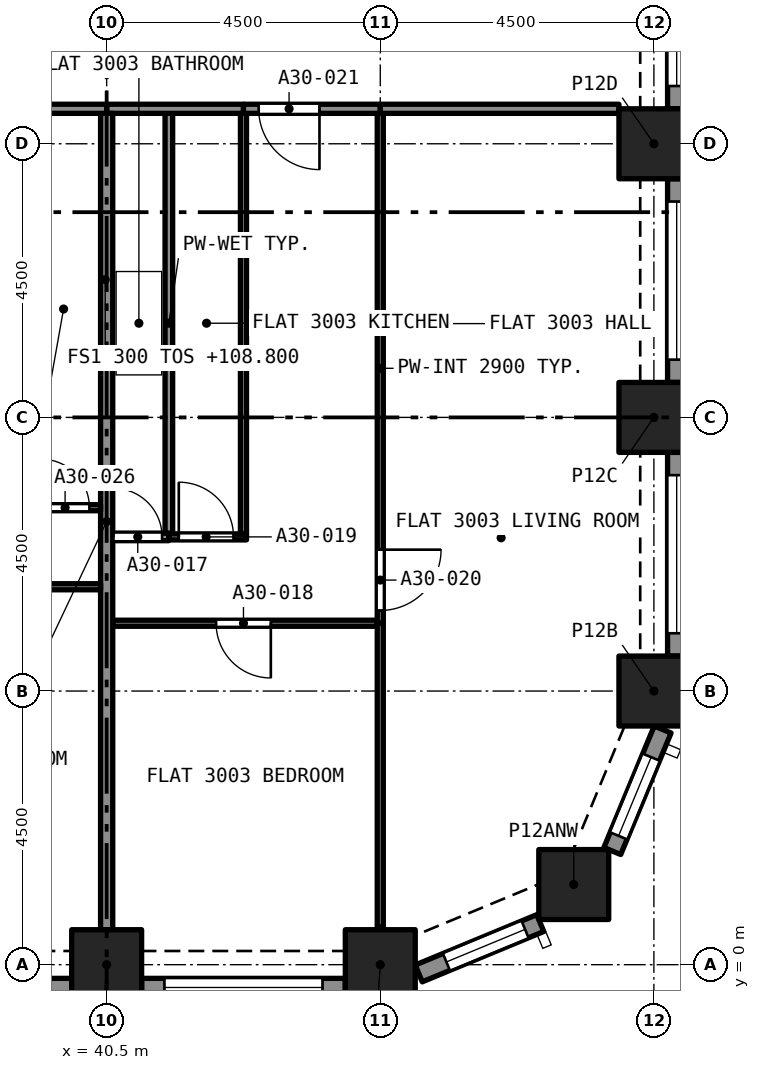
"""IFC4 building model, lengths in metres.
Left out: names, types, materials, properties, quantities, classifications, styles, units other than length and angle.
Written with IfcOpenShell. Run it as: python <this file> out.ifc"""

import sys

from ifc_helpers import new_model, si_unit, direction, frame, frame_2d, origin, origin_2d, place, context, subcontext, project, spatial, rectangle, extrude, element, fill, save


model = new_model("IFC4")
c1 = context("Model", 3, precision=1e-05, world=origin(), true_north=direction((0.0, 1.0)))
c2 = subcontext(c1, "Body", "Model", "MODEL_VIEW")
j1 = project(units=[si_unit("LENGTHUNIT", "METRE"), si_unit("PLANEANGLEUNIT", "RADIAN")], contexts=[c1])
p1 = place(None, origin())
s1 = spatial("IfcSite", under=j1, at=p1, CompositionType="ELEMENT")
p2 = place(p1, origin())
s2 = spatial("IfcBuilding", under=s1, at=p2, CompositionType="ELEMENT")
p3 = place(p2, frame((0.0, 0.0, 108.8)))
s3 = spatial("IfcBuildingStorey", under=s2, at=p3, CompositionType="ELEMENT", Elevation=108.8)
for number, where, z_axis, x_axis in (
    (1, (40.5, 0.0, 0.0), (0.0, 0.0, 1.0), (1.0, 0.0, 0.0)),
    (2, (45.0, 0.0, 0.0), (0.0, 0.0, 1.0), (1.0, 0.0, 0.0)),
    (3, (48.182, 1.318, 0.0), (0.0, 0.0, 1.0), (1.0, 0.0, 0.0)),
    (4, (49.5, 4.5, 0.0), (0.0, 0.0, 1.0), (1.0, 0.0, 0.0)),
    (5, (49.5, 9.0, 0.0), (0.0, 0.0, 1.0), (1.0, 0.0, 0.0)),
    (6, (49.5, 13.5, 0.0), (0.0, 0.0, 1.0), (1.0, 0.0, 0.0)),
):
    element("IfcColumn", number, at=place(p3, frame(where, z_axis=z_axis, x_axis=x_axis)), inside=s3, PredefinedType="COLUMN", context=c2, shape_type="SweptSolid", body=[
        extrude(rectangle(XDim=1.15, YDim=1.15, at=origin_2d()), origin(), (0.0, 0.0, 1.0), 3.2),
    ])
p4 = place(p3, frame((39.925, -0.375, 0.0), z_axis=(0.0, 0.0, 1.0), x_axis=(-1.0, 0.0, 0.0)))
e7 = element("IfcWall", 7, at=p4, inside=s3, PredefinedType="SOLIDWALL", context=c2, shape_type="SweptSolid", body=[
    extrude(rectangle(XDim=3.35, YDim=0.3, at=frame_2d((1.675, 0.0))), origin(), (0.0, 0.0, 1.0), 3.2),
])
p5 = place(p4, frame((0.375, 0.0, 0.45)))
e8 = element("IfcOpeningElement", 8, at=p5, cuts=e7, PredefinedType="OPENING", context=c2, shape_type="SweptSolid", body=[
    extrude(rectangle(XDim=2.6, YDim=1.95, at=frame_2d((1.3, 0.975))), frame((0.0, 0.16, 0.0), z_axis=(0.0, -1.0, 0.0), x_axis=(1.0, 0.0, 0.0)), (0.0, 0.0, 1.0), 0.32),
])
p6 = place(p3, frame((44.425, -0.375, 0.0), z_axis=(0.0, 0.0, 1.0), x_axis=(-1.0, 0.0, 0.0)))
e9 = element("IfcWall", 9, at=p6, inside=s3, PredefinedType="SOLIDWALL", context=c2, shape_type="SweptSolid", body=[
    extrude(rectangle(XDim=3.35, YDim=0.3, at=frame_2d((1.675, 0.0))), origin(), (0.0, 0.0, 1.0), 3.2),
])
p7 = place(p6, frame((0.375, 0.0, 0.45)))
e10 = element("IfcOpeningElement", 10, at=p7, cuts=e9, PredefinedType="OPENING", context=c2, shape_type="SweptSolid", body=[
    extrude(rectangle(XDim=2.6, YDim=1.95, at=frame_2d((1.3, 0.975))), frame((0.0, 0.16, 0.0), z_axis=(0.0, -1.0, 0.0), x_axis=(1.0, 0.0, 0.0)), (0.0, 0.0, 1.0), 0.32),
])
p8 = place(p3, frame((47.631, 0.684, 0.0), z_axis=(0.0, 0.0, 1.0), x_axis=(-0.923862802911, -0.382723818695, 0.0)))
e11 = element("IfcWall", 11, at=p8, inside=s3, PredefinedType="SOLIDWALL", context=c2, shape_type="SweptSolid", body=[
    extrude(rectangle(XDim=2.164, YDim=0.3, at=frame_2d((1.082, 0.0))), origin(), (0.0, 0.0, 1.0), 3.2),
])
p9 = place(p8, frame((0.271, 0.0, 0.45)))
e12 = element("IfcOpeningElement", 12, at=p9, cuts=e11, PredefinedType="OPENING", context=c2, shape_type="SweptSolid", body=[
    extrude(rectangle(XDim=1.4, YDim=1.95, at=frame_2d((0.7, 0.975))), frame((0.0, 0.16, 0.0), z_axis=(0.0, -1.0, 0.0), x_axis=(1.0, 0.0, 0.0)), (0.0, 0.0, 1.0), 0.32),
])
p10 = place(p3, frame((49.644, 3.868, 0.0), z_axis=(0.0, 0.0, 1.0), x_axis=(-0.382723818695, -0.923862802911, 0.0)))
e13 = element("IfcWall", 13, at=p10, inside=s3, PredefinedType="SOLIDWALL", context=c2, shape_type="SweptSolid", body=[
    extrude(rectangle(XDim=2.164, YDim=0.3, at=frame_2d((1.082, 0.0))), origin(), (0.0, 0.0, 1.0), 3.2),
])
p11 = place(p10, frame((0.493, 0.0, 0.45)))
e14 = element("IfcOpeningElement", 14, at=p11, cuts=e13, PredefinedType="OPENING", context=c2, shape_type="SweptSolid", body=[
    extrude(rectangle(XDim=1.4, YDim=1.95, at=frame_2d((0.7, 0.975))), frame((0.0, 0.16, 0.0), z_axis=(0.0, -1.0, 0.0), x_axis=(1.0, 0.0, 0.0)), (0.0, 0.0, 1.0), 0.32),
])
p12 = place(p3, frame((49.875, 8.425, 0.0), z_axis=(0.0, 0.0, 1.0), x_axis=(0.0, -1.0, 0.0)))
e15 = element("IfcWall", 15, at=p12, inside=s3, PredefinedType="SOLIDWALL", context=c2, shape_type="SweptSolid", body=[
    extrude(rectangle(XDim=3.35, YDim=0.3, at=frame_2d((1.675, 0.0))), origin(), (0.0, 0.0, 1.0), 3.2),
])
p13 = place(p12, frame((0.375, 0.0, 0.45)))
e16 = element("IfcOpeningElement", 16, at=p13, cuts=e15, PredefinedType="OPENING", context=c2, shape_type="SweptSolid", body=[
    extrude(rectangle(XDim=2.6, YDim=1.95, at=frame_2d((1.3, 0.975))), frame((0.0, 0.16, 0.0), z_axis=(0.0, -1.0, 0.0), x_axis=(1.0, 0.0, 0.0)), (0.0, 0.0, 1.0), 0.32),
])
p14 = place(p3, frame((49.875, 12.925, 0.0), z_axis=(0.0, 0.0, 1.0), x_axis=(0.0, -1.0, 0.0)))
e17 = element("IfcWall", 17, at=p14, inside=s3, PredefinedType="SOLIDWALL", context=c2, shape_type="SweptSolid", body=[
    extrude(rectangle(XDim=3.35, YDim=0.3, at=frame_2d((1.675, 0.0))), origin(), (0.0, 0.0, 1.0), 3.2),
])
p15 = place(p14, frame((0.375, 0.0, 0.45)))
e18 = element("IfcOpeningElement", 18, at=p15, cuts=e17, PredefinedType="OPENING", context=c2, shape_type="SweptSolid", body=[
    extrude(rectangle(XDim=2.6, YDim=1.95, at=frame_2d((1.3, 0.975))), frame((0.0, 0.16, 0.0), z_axis=(0.0, -1.0, 0.0), x_axis=(1.0, 0.0, 0.0)), (0.0, 0.0, 1.0), 0.32),
])
p16 = place(p3, frame((49.875, 17.425, 0.0), z_axis=(0.0, 0.0, 1.0), x_axis=(0.0, -1.0, 0.0)))
e19 = element("IfcWall", 19, at=p16, inside=s3, PredefinedType="SOLIDWALL", context=c2, shape_type="SweptSolid", body=[
    extrude(rectangle(XDim=3.35, YDim=0.3, at=frame_2d((1.675, 0.0))), origin(), (0.0, 0.0, 1.0), 3.2),
])
p17 = place(p16, frame((0.375, 0.0, 0.45)))
e20 = element("IfcOpeningElement", 20, at=p17, cuts=e19, PredefinedType="OPENING", context=c2, shape_type="SweptSolid", body=[
    extrude(rectangle(XDim=2.6, YDim=1.95, at=frame_2d((1.3, 0.975))), frame((0.0, 0.16, 0.0), z_axis=(0.0, -1.0, 0.0), x_axis=(1.0, 0.0, 0.0)), (0.0, 0.0, 1.0), 0.32),
])
p18 = place(p3, frame((40.6, 7.035, 0.0), z_axis=(0.0, 0.0, 1.0), x_axis=(1.0, 0.0, 0.0)))
e21 = element("IfcWall", 21, at=p18, inside=s3, PredefinedType="PARTITIONING", context=c2, shape_type="SweptSolid", body=[
    extrude(rectangle(XDim=0.923, YDim=0.125, at=frame_2d((0.461, 0.0))), origin(), (0.0, 0.0, 1.0), 2.9),
])
p19 = place(p18, frame((0.011, 0.0, 0.0)))
e22 = element("IfcOpeningElement", 22, at=p19, cuts=e21, PredefinedType="OPENING", context=c2, shape_type="SweptSolid", body=[
    extrude(rectangle(XDim=0.8, YDim=2.1, at=frame_2d((0.4, 1.05))), frame((0.0, 0.073, 0.0), z_axis=(0.0, -1.0, 0.0), x_axis=(1.0, 0.0, 0.0)), (0.0, 0.0, 1.0), 0.145),
])
p20 = place(p3, frame((41.523, 7.097, 0.0), z_axis=(0.0, 0.0, 1.0), x_axis=(0.0, 1.0, 0.0)))
e23 = element("IfcWall", 23, at=p20, inside=s3, PredefinedType="PARTITIONING", context=c2, shape_type="SweptSolid", body=[
    extrude(rectangle(XDim=6.903, YDim=0.125, at=frame_2d((3.451, 0.0))), origin(), (0.0, 0.0, 1.0), 2.9),
])
p21 = place(p3, frame((40.5, 14.075, 0.0), z_axis=(0.0, 0.0, 1.0), x_axis=(1.0, 0.0, 0.0)))
e24 = element("IfcWall", 24, at=p21, inside=s3, PredefinedType="PARTITIONING", context=c2, shape_type="SweptSolid", body=[
    extrude(rectangle(XDim=2.25, YDim=0.15, at=frame_2d((1.125, 0.0))), origin(), (0.0, 0.0, 1.0), 2.9),
])
p22 = place(p3, frame((44.95, 5.615, 0.0), z_axis=(0.0, 0.0, 1.0), x_axis=(-1.0, 0.0, 0.0)))
e25 = element("IfcWall", 25, at=p22, inside=s3, PredefinedType="PARTITIONING", context=c2, shape_type="SweptSolid", body=[
    extrude(rectangle(XDim=4.35, YDim=0.1, at=frame_2d((2.175, 0.0))), origin(), (0.0, 0.0, 1.0), 2.9),
])
p23 = place(p22, frame((1.75, 0.0, 0.0)))
e26 = element("IfcOpeningElement", 26, at=p23, cuts=e25, PredefinedType="OPENING", context=c2, shape_type="SweptSolid", body=[
    extrude(rectangle(XDim=0.9, YDim=2.1, at=frame_2d((0.45, 1.05))), frame((0.0, 0.06, 0.0), z_axis=(0.0, -1.0, 0.0), x_axis=(1.0, 0.0, 0.0)), (0.0, 0.0, 1.0), 0.12),
])
p24 = place(p3, frame((45.0, 0.622, 0.0), z_axis=(0.0, 0.0, 1.0), x_axis=(0.0, 1.0, 0.0)))
e27 = element("IfcWall", 27, at=p24, inside=s3, PredefinedType="PARTITIONING", context=c2, shape_type="SweptSolid", body=[
    extrude(rectangle(XDim=4.993, YDim=0.1, at=frame_2d((2.496, 0.0))), origin(), (0.0, 0.0, 1.0), 2.9),
])
p25 = place(p3, frame((40.5, 0.575, 0.0), z_axis=(0.0, 0.0, 1.0), x_axis=(0.0, 1.0, 0.0)))
e28 = element("IfcWall", 28, at=p25, inside=s3, PredefinedType="PARTITIONING", context=c2, shape_type="SweptSolid", body=[
    extrude(rectangle(XDim=13.425, YDim=0.2, at=frame_2d((6.712, 0.0))), origin(), (0.0, 0.0, 1.0), 2.9),
])
p26 = place(p3, frame((41.523, 7.035, 0.0), z_axis=(0.0, 0.0, 1.0), x_axis=(1.0, 0.0, 0.0)))
e29 = element("IfcWall", 29, at=p26, inside=s3, PredefinedType="PARTITIONING", context=c2, shape_type="SweptSolid", body=[
    extrude(rectangle(XDim=1.277, YDim=0.1, at=frame_2d((0.639, 0.0))), origin(), (0.0, 0.0, 1.0), 2.9),
])
p27 = place(p26, frame((0.164, 0.0, 0.0)))
e30 = element("IfcOpeningElement", 30, at=p27, cuts=e29, PredefinedType="OPENING", context=c2, shape_type="SweptSolid", body=[
    extrude(rectangle(XDim=0.9, YDim=2.1, at=frame_2d((0.45, 1.05))), frame((0.0, 0.06, 0.0), z_axis=(0.0, -1.0, 0.0), x_axis=(1.0, 0.0, 0.0)), (0.0, 0.0, 1.0), 0.12),
])
p28 = place(p3, frame((42.75, 7.085, 0.0), z_axis=(0.0, 0.0, 1.0), x_axis=(0.0, 1.0, 0.0)))
e31 = element("IfcWall", 31, at=p28, inside=s3, PredefinedType="PARTITIONING", context=c2, shape_type="SweptSolid", body=[
    extrude(rectangle(XDim=6.915, YDim=0.1, at=frame_2d((3.458, 0.0))), origin(), (0.0, 0.0, 1.0), 2.9),
])
p29 = place(p3, frame((45.0, 14.0, 0.0), z_axis=(0.0, 0.0, 1.0), x_axis=(0.0, -1.0, 0.0)))
e32 = element("IfcWall", 32, at=p29, inside=s3, PredefinedType="PARTITIONING", context=c2, shape_type="SweptSolid", body=[
    extrude(rectangle(XDim=8.385, YDim=0.1, at=frame_2d((4.192, 0.0))), origin(), (0.0, 0.0, 1.0), 2.9),
])
p30 = place(p29, frame((7.175, 0.0, 0.0)))
e33 = element("IfcOpeningElement", 33, at=p30, cuts=e32, PredefinedType="OPENING", context=c2, shape_type="SweptSolid", body=[
    extrude(rectangle(XDim=1.0, YDim=2.1, at=frame_2d((0.5, 1.05))), frame((0.0, 0.06, 0.0), z_axis=(0.0, -1.0, 0.0), x_axis=(1.0, 0.0, 0.0)), (0.0, 0.0, 1.0), 0.12),
])
p31 = place(p3, frame((45.0, 14.075, 0.0), z_axis=(0.0, 0.0, 1.0), x_axis=(-1.0, 0.0, 0.0)))
e34 = element("IfcWall", 34, at=p31, inside=s3, PredefinedType="PARTITIONING", context=c2, shape_type="SweptSolid", body=[
    extrude(rectangle(XDim=2.25, YDim=0.15, at=frame_2d((1.125, 0.0))), origin(), (0.0, 0.0, 1.0), 2.9),
])
p32 = place(p31, frame((1.0, 0.0, 0.0)))
e35 = element("IfcOpeningElement", 35, at=p32, cuts=e34, PredefinedType="OPENING", context=c2, shape_type="SweptSolid", body=[
    extrude(rectangle(XDim=1.0, YDim=2.1, at=frame_2d((0.5, 1.05))), frame((0.0, 0.085, 0.0), z_axis=(0.0, -1.0, 0.0), x_axis=(1.0, 0.0, 0.0)), (0.0, 0.0, 1.0), 0.17),
])
p33 = place(p3, frame((45.0, 14.075, 0.0), z_axis=(0.0, 0.0, 1.0), x_axis=(1.0, 0.0, 0.0)))
e36 = element("IfcWall", 36, at=p33, inside=s3, PredefinedType="PARTITIONING", context=c2, shape_type="SweptSolid", body=[
    extrude(rectangle(XDim=3.925, YDim=0.15, at=frame_2d((1.962, 0.0))), origin(), (0.0, 0.0, 1.0), 2.9),
])
p34 = place(p3, frame((40.4, 6.215, 0.0), z_axis=(0.0, 0.0, 1.0), x_axis=(-1.0, 0.0, 0.0)))
e37 = element("IfcWall", 37, at=p34, inside=s3, PredefinedType="PARTITIONING", context=c2, shape_type="SweptSolid", body=[
    extrude(rectangle(XDim=4.4, YDim=0.1, at=frame_2d((2.2, 0.0))), origin(), (0.0, 0.0, 1.0), 2.9),
])
p35 = place(p34, frame((1.7, 0.0, 0.0)))
e38 = element("IfcOpeningElement", 38, at=p35, cuts=e37, PredefinedType="OPENING", context=c2, shape_type="SweptSolid", body=[
    extrude(rectangle(XDim=0.9, YDim=2.1, at=frame_2d((0.45, 1.05))), frame((0.0, 0.06, 0.0), z_axis=(0.0, -1.0, 0.0), x_axis=(1.0, 0.0, 0.0)), (0.0, 0.0, 1.0), 0.12),
])
p36 = place(p3, frame((39.133, 7.515, 0.0), z_axis=(0.0, 0.0, 1.0), x_axis=(1.0, 0.0, 0.0)))
e39 = element("IfcWall", 39, at=p36, inside=s3, PredefinedType="PARTITIONING", context=c2, shape_type="SweptSolid", body=[
    extrude(rectangle(XDim=1.267, YDim=0.1, at=frame_2d((0.634, 0.0))), origin(), (0.0, 0.0, 1.0), 2.9),
])
p37 = place(p36, frame((0.284, 0.0, 0.0)))
e40 = element("IfcOpeningElement", 40, at=p37, cuts=e39, PredefinedType="OPENING", context=c2, shape_type="SweptSolid", body=[
    extrude(rectangle(XDim=0.8, YDim=2.1, at=frame_2d((0.4, 1.05))), frame((0.0, 0.06, 0.0), z_axis=(0.0, -1.0, 0.0), x_axis=(1.0, 0.0, 0.0)), (0.0, 0.0, 1.0), 0.12),
])
p38 = place(p3, frame((36.75, 14.075, 0.0), z_axis=(0.0, 0.0, 1.0), x_axis=(1.0, 0.0, 0.0)))
e41 = element("IfcWall", 41, at=p38, inside=s3, PredefinedType="PARTITIONING", context=c2, shape_type="SweptSolid", body=[
    extrude(rectangle(XDim=3.75, YDim=0.15, at=frame_2d((1.875, 0.0))), origin(), (0.0, 0.0, 1.0), 2.9),
])
p39 = place(p7, origin())
e42 = element("IfcWindow", 42, at=p39, inside=s3, PartitioningType="SINGLE_PANEL", PredefinedType="WINDOW", context=c2, shape_type="SweptSolid", body=[
    extrude(rectangle(XDim=2.6, YDim=1.95, at=frame_2d((1.3, 0.975))), frame((0.0, 0.03, 0.0), z_axis=(0.0, -1.0, 0.0), x_axis=(1.0, 0.0, 0.0)), (0.0, 0.0, 1.0), 0.06),
])
fill(e10, e42)
p40 = place(p9, origin())
e43 = element("IfcWindow", 43, at=p40, inside=s3, PartitioningType="SINGLE_PANEL", PredefinedType="WINDOW", context=c2, shape_type="SweptSolid", body=[
    extrude(rectangle(XDim=1.4, YDim=1.95, at=frame_2d((0.7, 0.975))), frame((0.0, 0.03, 0.0), z_axis=(0.0, -1.0, 0.0), x_axis=(1.0, 0.0, 0.0)), (0.0, 0.0, 1.0), 0.06),
])
fill(e12, e43)
p41 = place(p11, origin())
e44 = element("IfcWindow", 44, at=p41, inside=s3, PartitioningType="SINGLE_PANEL", PredefinedType="WINDOW", context=c2, shape_type="SweptSolid", body=[
    extrude(rectangle(XDim=1.4, YDim=1.95, at=frame_2d((0.7, 0.975))), frame((0.0, 0.03, 0.0), z_axis=(0.0, -1.0, 0.0), x_axis=(1.0, 0.0, 0.0)), (0.0, 0.0, 1.0), 0.06),
])
fill(e14, e44)
p42 = place(p13, origin())
e45 = element("IfcWindow", 45, at=p42, inside=s3, PartitioningType="SINGLE_PANEL", PredefinedType="WINDOW", context=c2, shape_type="SweptSolid", body=[
    extrude(rectangle(XDim=2.6, YDim=1.95, at=frame_2d((1.3, 0.975))), frame((0.0, 0.03, 0.0), z_axis=(0.0, -1.0, 0.0), x_axis=(1.0, 0.0, 0.0)), (0.0, 0.0, 1.0), 0.06),
])
fill(e16, e45)
p43 = place(p15, origin())
e46 = element("IfcWindow", 46, at=p43, inside=s3, PartitioningType="SINGLE_PANEL", PredefinedType="WINDOW", context=c2, shape_type="SweptSolid", body=[
    extrude(rectangle(XDim=2.6, YDim=1.95, at=frame_2d((1.3, 0.975))), frame((0.0, 0.03, 0.0), z_axis=(0.0, -1.0, 0.0), x_axis=(1.0, 0.0, 0.0)), (0.0, 0.0, 1.0), 0.06),
])
fill(e18, e46)
p44 = place(p17, origin())
e47 = element("IfcWindow", 47, at=p44, inside=s3, PartitioningType="SINGLE_PANEL", PredefinedType="WINDOW", context=c2, shape_type="SweptSolid", body=[
    extrude(rectangle(XDim=2.6, YDim=1.95, at=frame_2d((1.3, 0.975))), frame((0.0, 0.03, 0.0), z_axis=(0.0, -1.0, 0.0), x_axis=(1.0, 0.0, 0.0)), (0.0, 0.0, 1.0), 0.06),
])
fill(e20, e47)
p45 = place(p19, origin())
e48 = element("IfcDoor", 48, at=p45, inside=s3, OperationType="SINGLE_SWING_LEFT", PredefinedType="DOOR", context=c2, shape_type="SweptSolid", body=[
    extrude(rectangle(XDim=0.8, YDim=2.1, at=frame_2d((0.4, 1.05))), frame((0.0, 0.025, 0.0), z_axis=(0.0, -1.0, 0.0), x_axis=(1.0, 0.0, 0.0)), (0.0, 0.0, 1.0), 0.05),
])
fill(e22, e48)
p46 = place(p23, origin())
e49 = element("IfcDoor", 49, at=p46, inside=s3, OperationType="SINGLE_SWING_RIGHT", PredefinedType="DOOR", context=c2, shape_type="SweptSolid", body=[
    extrude(rectangle(XDim=0.9, YDim=2.1, at=frame_2d((0.45, 1.05))), frame((0.0, 0.025, 0.0), z_axis=(0.0, -1.0, 0.0), x_axis=(1.0, 0.0, 0.0)), (0.0, 0.0, 1.0), 0.05),
])
fill(e26, e49)
p47 = place(p27, origin())
e50 = element("IfcDoor", 50, at=p47, inside=s3, OperationType="SINGLE_SWING_LEFT", PredefinedType="DOOR", context=c2, shape_type="SweptSolid", body=[
    extrude(rectangle(XDim=0.9, YDim=2.1, at=frame_2d((0.45, 1.05))), frame((0.0, 0.025, 0.0), z_axis=(0.0, -1.0, 0.0), x_axis=(1.0, 0.0, 0.0)), (0.0, 0.0, 1.0), 0.05),
])
fill(e30, e50)
p48 = place(p30, origin())
e51 = element("IfcDoor", 51, at=p48, inside=s3, OperationType="SINGLE_SWING_RIGHT", PredefinedType="DOOR", context=c2, shape_type="SweptSolid", body=[
    extrude(rectangle(XDim=1.0, YDim=2.1, at=frame_2d((0.5, 1.05))), frame((0.0, 0.025, 0.0), z_axis=(0.0, -1.0, 0.0), x_axis=(1.0, 0.0, 0.0)), (0.0, 0.0, 1.0), 0.05),
])
fill(e33, e51)
p49 = place(p32, origin())
e52 = element("IfcDoor", 52, at=p49, inside=s3, OperationType="SINGLE_SWING_RIGHT", PredefinedType="DOOR", context=c2, shape_type="SweptSolid", body=[
    extrude(rectangle(XDim=1.0, YDim=2.1, at=frame_2d((0.5, 1.05))), frame((0.0, 0.025, 0.0), z_axis=(0.0, -1.0, 0.0), x_axis=(1.0, 0.0, 0.0)), (0.0, 0.0, 1.0), 0.05),
])
fill(e35, e52)
p50 = place(p37, origin())
e53 = element("IfcDoor", 53, at=p50, inside=s3, OperationType="SINGLE_SWING_RIGHT", PredefinedType="DOOR", context=c2, shape_type="SweptSolid", body=[
    extrude(rectangle(XDim=0.8, YDim=2.1, at=frame_2d((0.4, 1.05))), frame((0.0, 0.025, 0.0), z_axis=(0.0, -1.0, 0.0), x_axis=(1.0, 0.0, 0.0)), (0.0, 0.0, 1.0), 0.05),
])
fill(e40, e53)
save(model, sys.argv[1])
